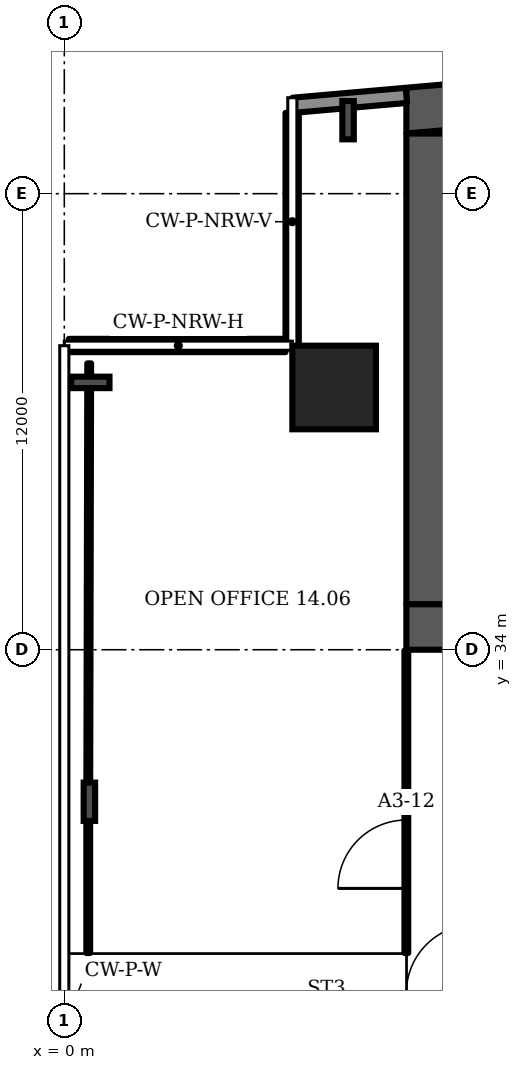
"""IFC4 building model, lengths in metres.
Left out: names, types, materials, properties, quantities, classifications, styles, units other than length and angle.
Written with IfcOpenShell. Run it as: python <this file> out.ifc"""

import sys

from ifc_helpers import new_model, si_unit, direction, frame, frame_2d, origin, origin_2d, place, context, subcontext, project, spatial, polyline, rectangle, i_section, outline, extrude, element, fill, save


model = new_model("IFC4")
c1 = context("Model", 3, precision=1e-05, world=origin(), true_north=direction((0.0, 1.0)))
c2 = subcontext(c1, "Body", "Model", "MODEL_VIEW")
j1 = project(units=[si_unit("LENGTHUNIT", "METRE"), si_unit("PLANEANGLEUNIT", "RADIAN")], contexts=[c1])
p1 = place(None, origin())
s1 = spatial("IfcSite", under=j1, at=p1, CompositionType="ELEMENT")
p2 = place(p1, origin())
s2 = spatial("IfcBuilding", under=s1, at=p2, CompositionType="ELEMENT")
p3 = place(p2, frame((0.0, 0.0, 70.3)))
s3 = spatial("IfcBuildingStorey", under=s2, at=p3, CompositionType="ELEMENT", Elevation=70.3)
p4 = place(p3, frame((0.0, 0.0, -0.0)))
e1 = element("IfcWall", 1, at=p4, inside=s3, PredefinedType="SHEAR", context=c2, shape_type="SweptSolid", body=[
    extrude(outline(polyline([(9.0, 47.583), (37.0, 50.032), (65.0, 47.583), (65.0, 48.787), (37.0, 51.237), (9.0, 48.787), (9.0, 47.583)])), origin(), (0.0, 0.0, 1.0), 3.6),
])
p5 = place(p3, frame((9.0, 34.6, 0.0), z_axis=(0.0, 0.0, 1.0), x_axis=(1.0, 0.0, 0.0)))
e2 = element("IfcWall", 2, at=p5, inside=s3, PredefinedType="SHEAR", context=c2, shape_type="SweptSolid", body=[
    extrude(rectangle(XDim=56.0, YDim=1.2, at=frame_2d((28.0, 0.0))), origin(), (0.0, 0.0, 1.0), 3.6),
])
p6 = place(p5, frame((3.3, 0.0, 0.0)))
e3 = element("IfcOpeningElement", 3, at=p6, cuts=e2, PredefinedType="OPENING", context=c2, shape_type="SweptSolid", body=[
    extrude(rectangle(XDim=1.0, YDim=2.1, at=frame_2d((0.5, 1.05))), frame((0.0, 0.61, 0.0), z_axis=(0.0, -1.0, 0.0), x_axis=(1.0, 0.0, 0.0)), (0.0, 0.0, 1.0), 1.22),
])
p7 = place(p5, frame((7.867, 0.0, 0.0)))
e4 = element("IfcOpeningElement", 4, at=p7, cuts=e2, PredefinedType="OPENING", context=c2, shape_type="SweptSolid", body=[
    extrude(rectangle(XDim=1.1, YDim=2.1, at=frame_2d((0.55, 1.05))), frame((0.0, 0.61, 0.0), z_axis=(0.0, -1.0, 0.0), x_axis=(1.0, 0.0, 0.0)), (0.0, 0.0, 1.0), 1.22),
])
p8 = place(p5, frame((12.033, 0.0, 0.0)))
e5 = element("IfcOpeningElement", 5, at=p8, cuts=e2, PredefinedType="OPENING", context=c2, shape_type="SweptSolid", body=[
    extrude(rectangle(XDim=1.1, YDim=2.1, at=frame_2d((0.55, 1.05))), frame((0.0, 0.61, 0.0), z_axis=(0.0, -1.0, 0.0), x_axis=(1.0, 0.0, 0.0)), (0.0, 0.0, 1.0), 1.22),
])
p9 = place(p5, frame((9.8, 0.0, 0.0)))
e6 = element("IfcOpeningElement", 6, at=p9, cuts=e2, PredefinedType="OPENING", context=c2, shape_type="SweptSolid", body=[
    extrude(rectangle(XDim=1.4, YDim=2.1, at=frame_2d((0.7, 1.05))), frame((0.0, 0.61, 0.0), z_axis=(0.0, -1.0, 0.0), x_axis=(1.0, 0.0, 0.0)), (0.0, 0.0, 1.0), 1.22),
])
p10 = place(p5, frame((14.65, 0.0, 0.0)))
e7 = element("IfcOpeningElement", 7, at=p10, cuts=e2, PredefinedType="OPENING", context=c2, shape_type="SweptSolid", body=[
    extrude(rectangle(XDim=1.2, YDim=2.1, at=frame_2d((0.6, 1.05))), frame((0.0, 0.61, 0.0), z_axis=(0.0, -1.0, 0.0), x_axis=(1.0, 0.0, 0.0)), (0.0, 0.0, 1.0), 1.22),
])
p11 = place(p5, frame((21.867, 0.0, 0.0)))
e8 = element("IfcOpeningElement", 8, at=p11, cuts=e2, PredefinedType="OPENING", context=c2, shape_type="SweptSolid", body=[
    extrude(rectangle(XDim=1.1, YDim=2.1, at=frame_2d((0.55, 1.05))), frame((0.0, 0.61, 0.0), z_axis=(0.0, -1.0, 0.0), x_axis=(1.0, 0.0, 0.0)), (0.0, 0.0, 1.0), 1.22),
])
p12 = place(p5, frame((26.033, 0.0, 0.0)))
e9 = element("IfcOpeningElement", 9, at=p12, cuts=e2, PredefinedType="OPENING", context=c2, shape_type="SweptSolid", body=[
    extrude(rectangle(XDim=1.1, YDim=2.1, at=frame_2d((0.55, 1.05))), frame((0.0, 0.61, 0.0), z_axis=(0.0, -1.0, 0.0), x_axis=(1.0, 0.0, 0.0)), (0.0, 0.0, 1.0), 1.22),
])
p13 = place(p5, frame((23.8, 0.0, 0.0)))
e10 = element("IfcOpeningElement", 10, at=p13, cuts=e2, PredefinedType="OPENING", context=c2, shape_type="SweptSolid", body=[
    extrude(rectangle(XDim=1.4, YDim=2.1, at=frame_2d((0.7, 1.05))), frame((0.0, 0.61, 0.0), z_axis=(0.0, -1.0, 0.0), x_axis=(1.0, 0.0, 0.0)), (0.0, 0.0, 1.0), 1.22),
])
p14 = place(p5, frame((28.867, 0.0, 0.0)))
e11 = element("IfcOpeningElement", 11, at=p14, cuts=e2, PredefinedType="OPENING", context=c2, shape_type="SweptSolid", body=[
    extrude(rectangle(XDim=1.1, YDim=2.1, at=frame_2d((0.55, 1.05))), frame((0.0, 0.61, 0.0), z_axis=(0.0, -1.0, 0.0), x_axis=(1.0, 0.0, 0.0)), (0.0, 0.0, 1.0), 1.22),
])
p15 = place(p5, frame((33.033, 0.0, 0.0)))
e12 = element("IfcOpeningElement", 12, at=p15, cuts=e2, PredefinedType="OPENING", context=c2, shape_type="SweptSolid", body=[
    extrude(rectangle(XDim=1.1, YDim=2.1, at=frame_2d((0.55, 1.05))), frame((0.0, 0.61, 0.0), z_axis=(0.0, -1.0, 0.0), x_axis=(1.0, 0.0, 0.0)), (0.0, 0.0, 1.0), 1.22),
])
p16 = place(p5, frame((40.15, 0.0, 0.0)))
e13 = element("IfcOpeningElement", 13, at=p16, cuts=e2, PredefinedType="OPENING", context=c2, shape_type="SweptSolid", body=[
    extrude(rectangle(XDim=1.2, YDim=2.1, at=frame_2d((0.6, 1.05))), frame((0.0, 0.61, 0.0), z_axis=(0.0, -1.0, 0.0), x_axis=(1.0, 0.0, 0.0)), (0.0, 0.0, 1.0), 1.22),
])
p17 = place(p5, frame((44.8, 0.0, 0.0)))
e14 = element("IfcOpeningElement", 14, at=p17, cuts=e2, PredefinedType="OPENING", context=c2, shape_type="SweptSolid", body=[
    extrude(rectangle(XDim=1.4, YDim=2.1, at=frame_2d((0.7, 1.05))), frame((0.0, 0.61, 0.0), z_axis=(0.0, -1.0, 0.0), x_axis=(1.0, 0.0, 0.0)), (0.0, 0.0, 1.0), 1.22),
])
p18 = place(p5, frame((49.867, 0.0, 0.0)))
e15 = element("IfcOpeningElement", 15, at=p18, cuts=e2, PredefinedType="OPENING", context=c2, shape_type="SweptSolid", body=[
    extrude(rectangle(XDim=1.1, YDim=2.1, at=frame_2d((0.55, 1.05))), frame((0.0, 0.61, 0.0), z_axis=(0.0, -1.0, 0.0), x_axis=(1.0, 0.0, 0.0)), (0.0, 0.0, 1.0), 1.22),
])
p19 = place(p5, frame((53.5, 0.0, 0.0)))
e16 = element("IfcOpeningElement", 16, at=p19, cuts=e2, PredefinedType="OPENING", context=c2, shape_type="SweptSolid", body=[
    extrude(rectangle(XDim=1.1, YDim=2.1, at=frame_2d((0.55, 1.05))), frame((0.0, 0.61, 0.0), z_axis=(0.0, -1.0, 0.0), x_axis=(1.0, 0.0, 0.0)), (0.0, 0.0, 1.0), 1.22),
])
p20 = place(p5, frame((51.567, 0.0, 0.0)))
e17 = element("IfcOpeningElement", 17, at=p20, cuts=e2, PredefinedType="OPENING", context=c2, shape_type="SweptSolid", body=[
    extrude(rectangle(XDim=1.4, YDim=2.1, at=frame_2d((0.7, 1.05))), frame((0.0, 0.61, 0.0), z_axis=(0.0, -1.0, 0.0), x_axis=(1.0, 0.0, 0.0)), (0.0, 0.0, 1.0), 1.22),
])
p21 = place(p3, frame((9.6, 35.2, 0.0), z_axis=(0.0, 0.0, 1.0), x_axis=(0.0, 1.0, 0.0)))
e18 = element("IfcWall", 18, at=p21, inside=s3, PredefinedType="SHEAR", context=c2, shape_type="SweptSolid", body=[
    extrude(rectangle(XDim=12.383, YDim=1.2, at=frame_2d((6.191, 0.0))), origin(), (0.0, 0.0, 1.0), 3.6),
])
p22 = place(p3, frame((7.1, 40.9, 0.0), z_axis=(0.0, 0.0, 1.0), x_axis=(1.0, 0.0, 0.0)))
e19 = element("IfcColumn", 19, at=p22, inside=s3, PredefinedType="COLUMN", context=c2, shape_type="SweptSolid", body=[
    extrude(rectangle(XDim=2.2, YDim=2.2, at=origin_2d()), origin(), (0.0, 0.0, 1.0), 3.6),
])
for number, where, z_axis, x_axis in (
    (20, (7.467, 47.934, 0.0), (0.0, 0.0, 1.0), (-1.0, 0.0, 0.0)),
    (21, (0.685, 41.034, 0.0), (0.0, 0.0, 1.0), (0.0, 1.0, 0.0)),
    (22, (0.66, 30.0, 0.0), (0.0, 0.0, 1.0), (-1.0, 0.0, 0.0)),
):
    element("IfcColumn", number, at=place(p3, frame(where, z_axis=z_axis, x_axis=x_axis)), inside=s3, PredefinedType="COLUMN", context=c2, shape_type="SweptSolid", body=[
        extrude(i_section(OverallWidth=0.302, OverallDepth=1.008, WebThickness=0.021, FlangeThickness=0.04, FilletRadius=0.03, at=origin_2d()), origin(), (0.0, 0.0, 1.0), 3.6),
    ])
p23 = place(p3, frame((9.0, 48.587, 0.0), z_axis=(0.0, 0.0, 1.0), x_axis=(-0.996194, -0.087168, 0.0)))
e23 = element("IfcWall", 23, at=p23, inside=s3, PredefinedType="SOLIDWALL", context=c2, shape_type="SweptSolid", body=[
    extrude(rectangle(XDim=2.994, YDim=0.4, at=frame_2d((1.497, 0.0))), origin(), (0.0, 0.0, 1.0), 3.2),
])
p24 = place(p3, frame((5.995, 48.126, 0.0), z_axis=(0.0, 0.0, 1.0), x_axis=(0.0, -1.0, 0.0)))
e24 = element("IfcWall", 24, at=p24, inside=s3, PredefinedType="SOLIDWALL", context=c2, shape_type="SweptSolid", body=[
    extrude(rectangle(XDim=6.126, YDim=0.35, at=frame_2d((3.063, 0.0))), origin(), (0.0, 0.0, 1.0), 1.0),
])
p25 = place(p3, frame((5.82, 42.005, 0.0), z_axis=(0.0, 0.0, 1.0), x_axis=(-1.0, 0.0, 0.0)))
e25 = element("IfcWall", 25, at=p25, inside=s3, PredefinedType="SOLIDWALL", context=c2, shape_type="SweptSolid", body=[
    extrude(rectangle(XDim=5.7, YDim=0.35, at=frame_2d((2.85, 0.0))), origin(), (0.0, 0.0, 1.0), 1.0),
])
p26 = place(p3, frame((0.63, 26.02, 0.0), z_axis=(0.0, 0.0, 1.0), x_axis=(0.0, 1.0, 0.0)))
e26 = element("IfcWall", 26, at=p26, inside=s3, PredefinedType="PARTITIONING", context=c2, shape_type="SweptSolid", body=[
    extrude(rectangle(XDim=3.98, YDim=0.1, at=frame_2d((1.99, 0.0))), origin(), (0.0, 0.0, 1.0), 2.58),
])
p27 = place(p3, frame((0.63, 30.0, 0.0), z_axis=(0.0, 0.0, 1.0), x_axis=(0.00218, 0.999994, 0.0)))
e27 = element("IfcWall", 27, at=p27, inside=s3, PredefinedType="PARTITIONING", context=c2, shape_type="SweptSolid", body=[
    extrude(rectangle(XDim=11.535, YDim=0.1, at=frame_2d((5.768, 0.0))), origin(), (0.0, 0.0, 1.0), 2.58),
])
p28 = place(p3, frame((9.0, 26.02, 0.0), z_axis=(0.0, 0.0, 1.0), x_axis=(0.0, 1.0, 0.0)))
e28 = element("IfcWall", 28, at=p28, inside=s3, PredefinedType="PARTITIONING", context=c2, shape_type="SweptSolid", body=[
    extrude(rectangle(XDim=7.96, YDim=0.1, at=frame_2d((3.98, 0.0))), origin(), (0.0, 0.0, 1.0), 3.2),
])
p29 = place(p28, frame((1.7, 0.0, 0.0)))
e29 = element("IfcOpeningElement", 29, at=p29, cuts=e28, PredefinedType="OPENING", context=c2, shape_type="SweptSolid", body=[
    extrude(rectangle(XDim=1.8, YDim=2.1, at=frame_2d((0.9, 1.05))), frame((0.0, 0.06, 0.0), z_axis=(0.0, -1.0, 0.0), x_axis=(1.0, 0.0, 0.0)), (0.0, 0.0, 1.0), 0.12),
])
p30 = place(p29, origin())
e30 = element("IfcDoor", 30, at=p30, inside=s3, OperationType="DOUBLE_DOOR_SINGLE_SWING", PredefinedType="DOOR", context=c2, shape_type="SweptSolid", body=[
    extrude(rectangle(XDim=1.8, YDim=2.1, at=frame_2d((0.9, 1.05))), frame((0.0, 0.025, 0.0), z_axis=(0.0, -1.0, 0.0), x_axis=(1.0, 0.0, 0.0)), (0.0, 0.0, 1.0), 0.05),
])
fill(e29, e30)
save(model, sys.argv[1])
